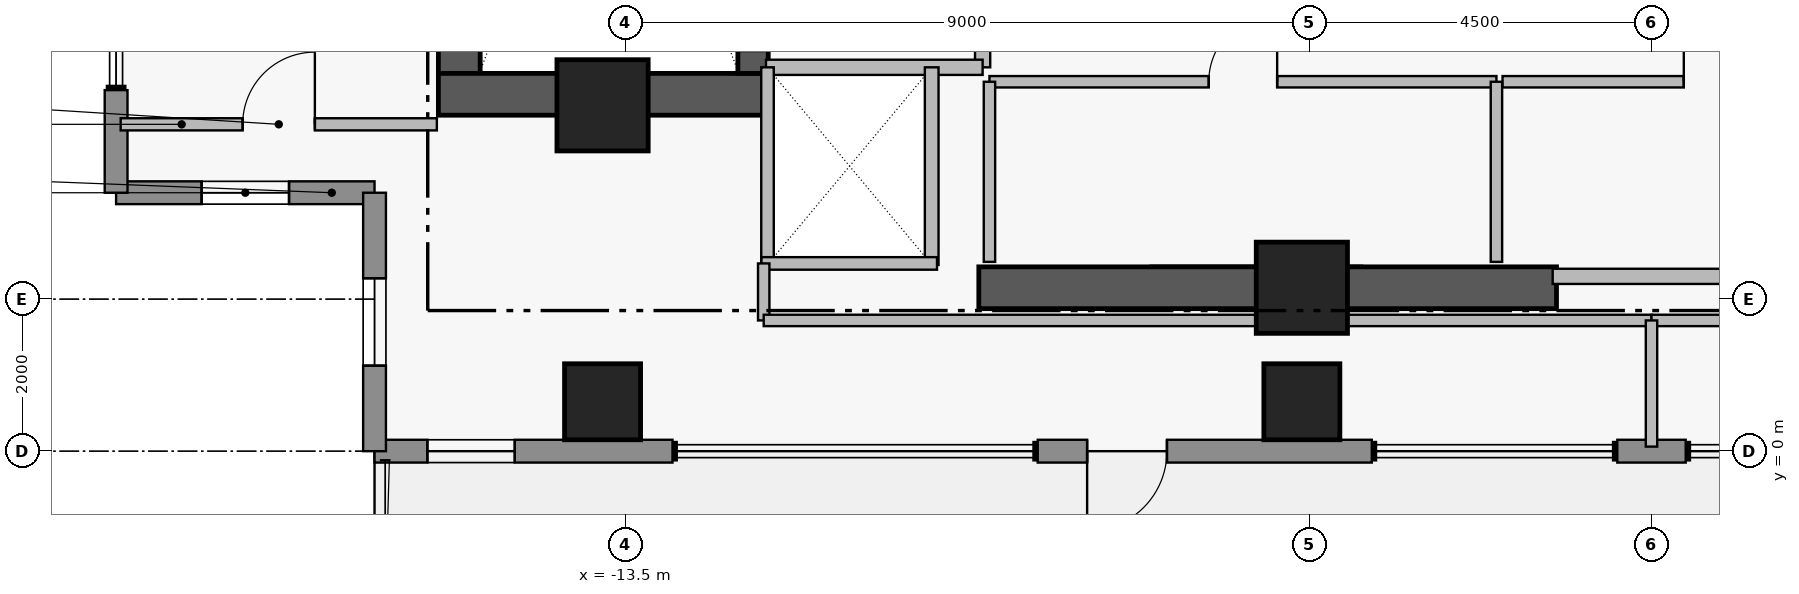
"""IFC4 building model, lengths in metres.
Left out: names, types, materials, properties, quantities, classifications, styles, units other than length and angle.
Written with IfcOpenShell. Run it as: python <this file> out.ifc"""

import sys

from ifc_helpers import new_model, si_unit, direction, frame, frame_2d, origin, origin_2d, place, context, subcontext, project, spatial, rectangle, extrude, element, fill, save


model = new_model("IFC4")
c1 = context("Model", 3, precision=1e-05, world=origin(), true_north=direction((0.0, 1.0)))
c2 = subcontext(c1, "Body", "Model", "MODEL_VIEW")
j1 = project(units=[si_unit("LENGTHUNIT", "METRE"), si_unit("PLANEANGLEUNIT", "RADIAN")], contexts=[c1])
p1 = place(None, origin())
s1 = spatial("IfcSite", under=j1, at=p1, CompositionType="ELEMENT")
p2 = place(p1, origin())
s2 = spatial("IfcBuilding", under=s1, at=p2, CompositionType="ELEMENT")
p3 = place(p2, frame((0.0, 0.0, 261.85)))
s3 = spatial("IfcBuildingStorey", under=s2, at=p3, CompositionType="ELEMENT", Elevation=261.85)
p4 = place(p3, frame((-15.685, 4.97, 0.0), z_axis=(0.0, 0.0, 1.0), x_axis=(0.0, 1.0, 0.0)))
e1 = element("IfcWall", 1, at=p4, inside=s3, PredefinedType="SHEAR", context=c2, shape_type="SweptSolid", body=[
    extrude(rectangle(XDim=8.96, YDim=0.55, at=frame_2d((4.48, 0.0))), origin(), (0.0, 0.0, 1.0), 3.51),
])
p5 = place(p3, frame((-15.96, 4.695, 0.0), z_axis=(0.0, 0.0, 1.0), x_axis=(1.0, 0.0, 0.0)))
e2 = element("IfcWall", 2, at=p5, inside=s3, PredefinedType="SHEAR", context=c2, shape_type="SweptSolid", body=[
    extrude(rectangle(XDim=4.36, YDim=0.55, at=frame_2d((2.18, 0.0))), origin(), (0.0, 0.0, 1.0), 3.51),
])
p6 = place(p3, frame((-8.85, 2.15, 0.0), z_axis=(0.0, 0.0, 1.0), x_axis=(1.0, 0.0, 0.0)))
e3 = element("IfcWall", 3, at=p6, inside=s3, PredefinedType="SHEAR", context=c2, shape_type="SweptSolid", body=[
    extrude(rectangle(XDim=7.6, YDim=0.55, at=frame_2d((3.8, 0.0))), origin(), (0.0, 0.0, 1.0), 3.48),
])
p7 = place(p3, frame((-11.82, 4.97, 0.0), z_axis=(0.0, 0.0, 1.0), x_axis=(0.0, 1.0, 0.0)))
e4 = element("IfcWall", 4, at=p7, inside=s3, PredefinedType="SHEAR", context=c2, shape_type="SweptSolid", body=[
    extrude(rectangle(XDim=8.96, YDim=0.4, at=frame_2d((4.48, 0.0))), origin(), (0.0, 0.0, 1.0), 3.51),
])
p8 = place(p7, frame((0.31, 0.0, 0.0)))
e5 = element("IfcOpeningElement", 5, at=p8, cuts=e4, PredefinedType="OPENING", context=c2, shape_type="SweptSolid", body=[
    extrude(rectangle(XDim=1.12, YDim=2.22, at=frame_2d((0.56, 1.11))), frame((0.0, 0.21, 0.0), z_axis=(0.0, -1.0, 0.0), x_axis=(1.0, 0.0, 0.0)), (0.0, 0.0, 1.0), 0.42),
])
for number, where, z_axis, x_axis in (
    (6, (-13.8, 4.55, 0.0), (0.0, 0.0, 1.0), (1.0, 0.0, 0.0)),
    (7, (-4.6, 2.15, 0.0), (0.0, 0.0, 1.0), (1.0, 0.0, 0.0)),
):
    element("IfcColumn", number, at=place(p3, frame(where, z_axis=z_axis, x_axis=x_axis)), inside=s3, PredefinedType="COLUMN", context=c2, shape_type="SweptSolid", body=[
        extrude(rectangle(XDim=1.2, YDim=1.2, at=origin_2d()), origin(), (0.0, 0.0, 1.0), 3.7),
    ])
for number, where, z_axis, x_axis in (
    (8, (-13.8, 0.65, 0.0), (0.0, 0.0, 1.0), (1.0, 0.0, 0.0)),
    (9, (-4.6, 0.65, 0.0), (0.0, 0.0, 1.0), (1.0, 0.0, 0.0)),
):
    element("IfcColumn", number, at=place(p3, frame(where, z_axis=z_axis, x_axis=x_axis)), inside=s3, PredefinedType="COLUMN", context=c2, shape_type="SweptSolid", body=[
        extrude(rectangle(XDim=1.0, YDim=1.0, at=origin_2d()), origin(), (0.0, 0.0, 1.0), 3.7),
    ])
p9 = place(p3, frame((-16.8, 3.4, 0.0), z_axis=(0.0, 0.0, 1.0), x_axis=(-1.0, 0.0, 0.0)))
e10 = element("IfcWall", 10, at=p9, inside=s3, PredefinedType="STANDARD", context=c2, shape_type="SweptSolid", body=[
    extrude(rectangle(XDim=3.4, YDim=0.3, at=frame_2d((1.7, 0.0))), origin(), (0.0, 0.0, 1.0), 3.48),
])
p10 = place(p9, frame((1.125, 0.0, 1.25)))
e11 = element("IfcOpeningElement", 11, at=p10, cuts=e10, PredefinedType="OPENING", context=c2, shape_type="SweptSolid", body=[
    extrude(rectangle(XDim=1.15, YDim=1.55, at=frame_2d((0.575, 0.775))), frame((0.0, 0.16, 0.0), z_axis=(0.0, -1.0, 0.0), x_axis=(1.0, 0.0, 0.0)), (0.0, 0.0, 1.0), 0.32),
])
p11 = place(p3, frame((-20.2, 3.4, 0.0), z_axis=(0.0, 0.0, 1.0), x_axis=(0.0, 1.0, 0.0)))
e12 = element("IfcWall", 12, at=p11, inside=s3, PredefinedType="STANDARD", context=c2, shape_type="SweptSolid", body=[
    extrude(rectangle(XDim=1.35, YDim=0.3, at=frame_2d((0.675, 0.0))), origin(), (0.0, 0.0, 1.0), 3.48),
])
p12 = place(p3, frame((0.45, 0.0, 0.0), z_axis=(0.0, 0.0, 1.0), x_axis=(-1.0, 0.0, 0.0)))
e13 = element("IfcWall", 13, at=p12, inside=s3, PredefinedType="STANDARD", context=c2, shape_type="SweptSolid", body=[
    extrude(rectangle(XDim=0.9, YDim=0.3, at=frame_2d((0.45, 0.0))), origin(), (0.0, 0.0, 1.0), 3.48),
])
p13 = place(p3, frame((-3.68, 0.0, 0.0), z_axis=(0.0, 0.0, 1.0), x_axis=(-1.0, 0.0, 0.0)))
e14 = element("IfcWall", 14, at=p13, inside=s3, PredefinedType="STANDARD", context=c2, shape_type="SweptSolid", body=[
    extrude(rectangle(XDim=4.395, YDim=0.3, at=frame_2d((2.198, 0.0))), origin(), (0.0, 0.0, 1.0), 3.48),
])
p14 = place(p13, frame((2.695, 0.0, 0.0)))
e15 = element("IfcOpeningElement", 15, at=p14, cuts=e14, PredefinedType="OPENING", context=c2, shape_type="SweptSolid", body=[
    extrude(rectangle(XDim=1.05, YDim=2.2, at=frame_2d((0.525, 1.1))), frame((0.0, 0.16, 0.0), z_axis=(0.0, -1.0, 0.0), x_axis=(1.0, 0.0, 0.0)), (0.0, 0.0, 1.0), 0.32),
])
p15 = place(p3, frame((-12.88, 0.0, 0.0), z_axis=(0.0, 0.0, 1.0), x_axis=(-1.0, 0.0, 0.0)))
e16 = element("IfcWall", 16, at=p15, inside=s3, PredefinedType="STANDARD", context=c2, shape_type="SweptSolid", body=[
    extrude(rectangle(XDim=3.92, YDim=0.3, at=frame_2d((1.96, 0.0))), origin(), (0.0, 0.0, 1.0), 3.48),
])
p16 = place(p15, frame((2.075, 0.0, 0.95)))
e17 = element("IfcOpeningElement", 17, at=p16, cuts=e16, PredefinedType="OPENING", context=c2, shape_type="SweptSolid", body=[
    extrude(rectangle(XDim=1.15, YDim=1.55, at=frame_2d((0.575, 0.775))), frame((0.0, 0.16, 0.0), z_axis=(0.0, -1.0, 0.0), x_axis=(1.0, 0.0, 0.0)), (0.0, 0.0, 1.0), 0.32),
])
p17 = place(p3, frame((-16.8, 0.0, 0.0), z_axis=(0.0, 0.0, 1.0), x_axis=(0.0, 1.0, 0.0)))
e18 = element("IfcWall", 18, at=p17, inside=s3, PredefinedType="STANDARD", context=c2, shape_type="SweptSolid", body=[
    extrude(rectangle(XDim=3.4, YDim=0.3, at=frame_2d((1.7, 0.0))), origin(), (0.0, 0.0, 1.0), 3.48),
])
p18 = place(p17, frame((1.125, 0.0, 1.25)))
e19 = element("IfcOpeningElement", 19, at=p18, cuts=e18, PredefinedType="OPENING", context=c2, shape_type="SweptSolid", body=[
    extrude(rectangle(XDim=1.15, YDim=1.55, at=frame_2d((0.575, 0.775))), frame((0.0, 0.16, 0.0), z_axis=(0.0, -1.0, 0.0), x_axis=(1.0, 0.0, 0.0)), (0.0, 0.0, 1.0), 0.32),
])
p19 = place(p3, frame((-8.8, 5.05, 0.0), z_axis=(0.0, 0.0, 1.0), x_axis=(0.0, 1.0, 0.0)))
e20 = element("IfcWall", 20, at=p19, inside=s3, PredefinedType="PARTITIONING", context=c2, shape_type="SweptSolid", body=[
    extrude(rectangle(XDim=6.1, YDim=0.2, at=frame_2d((3.05, 0.0))), origin(), (0.0, 0.0, 1.0), 3.48),
])
p20 = place(p19, frame((0.25, 0.0, 0.0)))
e21 = element("IfcOpeningElement", 21, at=p20, cuts=e20, PredefinedType="OPENING", context=c2, shape_type="SweptSolid", body=[
    extrude(rectangle(XDim=1.1, YDim=2.2, at=frame_2d((0.55, 1.1))), frame((0.0, 0.11, 0.0), z_axis=(0.0, -1.0, 0.0), x_axis=(1.0, 0.0, 0.0)), (0.0, 0.0, 1.0), 0.22),
])
p21 = place(p19, frame((3.85, 0.0, 0.0)))
e22 = element("IfcOpeningElement", 22, at=p21, cuts=e20, PredefinedType="OPENING", context=c2, shape_type="SweptSolid", body=[
    extrude(rectangle(XDim=1.1, YDim=2.2, at=frame_2d((0.55, 1.1))), frame((0.0, 0.11, 0.0), z_axis=(0.0, -1.0, 0.0), x_axis=(1.0, 0.0, 0.0)), (0.0, 0.0, 1.0), 0.22),
])
p22 = place(p3, frame((-8.71, 4.86, 0.0), z_axis=(0.0, 0.0, 1.0), x_axis=(1.0, 0.0, 0.0)))
e23 = element("IfcWall", 23, at=p22, inside=s3, PredefinedType="PARTITIONING", context=c2, shape_type="SweptSolid", body=[
    extrude(rectangle(XDim=6.67, YDim=0.15, at=frame_2d((3.335, 0.0))), origin(), (0.0, 0.0, 1.0), 3.48),
])
p23 = place(p22, frame((2.885, 0.0, 0.0)))
e24 = element("IfcOpeningElement", 24, at=p23, cuts=e23, PredefinedType="OPENING", context=c2, shape_type="SweptSolid", body=[
    extrude(rectangle(XDim=0.9, YDim=2.15, at=frame_2d((0.45, 1.075))), frame((0.0, 0.085, 0.0), z_axis=(0.0, -1.0, 0.0), x_axis=(1.0, 0.0, 0.0)), (0.0, 0.0, 1.0), 0.17),
])
p24 = place(p3, frame((-1.96, 4.86, 0.0), z_axis=(0.0, 0.0, 1.0), x_axis=(1.0, 0.0, 0.0)))
e25 = element("IfcWall", 25, at=p24, inside=s3, PredefinedType="PARTITIONING", context=c2, shape_type="SweptSolid", body=[
    extrude(rectangle(XDim=5.67, YDim=0.15, at=frame_2d((2.835, 0.0))), origin(), (0.0, 0.0, 1.0), 3.48),
])
p25 = place(p24, frame((2.385, 0.0, 0.0)))
e26 = element("IfcOpeningElement", 26, at=p25, cuts=e25, PredefinedType="OPENING", context=c2, shape_type="SweptSolid", body=[
    extrude(rectangle(XDim=0.9, YDim=2.15, at=frame_2d((0.45, 1.075))), frame((0.0, 0.085, 0.0), z_axis=(0.0, -1.0, 0.0), x_axis=(1.0, 0.0, 0.0)), (0.0, 0.0, 1.0), 0.17),
])
p26 = place(p3, frame((-20.14, 4.3, 0.0), z_axis=(0.0, 0.0, 1.0), x_axis=(1.0, 0.0, 0.0)))
e27 = element("IfcWall", 27, at=p26, inside=s3, PredefinedType="PARTITIONING", context=c2, shape_type="SweptSolid", body=[
    extrude(rectangle(XDim=4.16, YDim=0.16, at=frame_2d((2.08, 0.0))), origin(), (0.0, 0.0, 1.0), 3.48),
])
p27 = place(p26, frame((1.605, 0.0, 0.0)))
e28 = element("IfcOpeningElement", 28, at=p27, cuts=e27, PredefinedType="OPENING", context=c2, shape_type="SweptSolid", body=[
    extrude(rectangle(XDim=0.95, YDim=2.15, at=frame_2d((0.475, 1.075))), frame((0.0, 0.09, 0.0), z_axis=(0.0, -1.0, 0.0), x_axis=(1.0, 0.0, 0.0)), (0.0, 0.0, 1.0), 0.18),
])
p28 = place(p3, frame((-11.65, 5.05, 0.0), z_axis=(0.0, 0.0, 1.0), x_axis=(1.0, 0.0, 0.0)))
e29 = element("IfcWall", 29, at=p28, inside=s3, PredefinedType="PARTITIONING", context=c2, shape_type="SweptSolid", body=[
    extrude(rectangle(XDim=2.85, YDim=0.2, at=frame_2d((1.425, 0.0))), origin(), (0.0, 0.0, 1.0), 3.48),
])
p29 = place(p3, frame((-1.3, 2.3, 0.0), z_axis=(0.0, 0.0, 1.0), x_axis=(1.0, 0.0, 0.0)))
e30 = element("IfcWall", 30, at=p29, inside=s3, PredefinedType="PARTITIONING", context=c2, shape_type="SweptSolid", body=[
    extrude(rectangle(XDim=2.6, YDim=0.2, at=frame_2d((1.3, 0.0))), origin(), (0.0, 0.0, 1.0), 2.38),
])
for number, where, z_axis, x_axis in (
    (31, (-8.71, 2.49, 0.0), (0.0, 0.0, 1.0), (0.0, 1.0, 0.0)),
    (32, (-2.04, 2.49, 0.0), (0.0, 0.0, 1.0), (0.0, 1.0, 0.0)),
):
    element("IfcWall", number, at=place(p3, frame(where, z_axis=z_axis, x_axis=x_axis)), inside=s3, PredefinedType="PARTITIONING", context=c2, shape_type="SweptSolid", body=[
        extrude(rectangle(XDim=2.37, YDim=0.15, at=frame_2d((1.185, 0.0))), origin(), (0.0, 0.0, 1.0), 3.48),
    ])
p30 = place(p3, frame((-9.47, 2.45, 0.0), z_axis=(0.0, 0.0, 1.0), x_axis=(0.0, 1.0, 0.0)))
e33 = element("IfcWall", 33, at=p30, inside=s3, PredefinedType="PARTITIONING", context=c2, shape_type="SweptSolid", body=[
    extrude(rectangle(XDim=2.6, YDim=0.18, at=frame_2d((1.3, 0.0))), origin(), (0.0, 0.0, 1.0), 3.48),
])
p31 = place(p3, frame((-11.63, 2.47, 0.0), z_axis=(0.0, 0.0, 1.0), x_axis=(0.0, 1.0, 0.0)))
e34 = element("IfcWall", 34, at=p31, inside=s3, PredefinedType="PARTITIONING", context=c2, shape_type="SweptSolid", body=[
    extrude(rectangle(XDim=2.58, YDim=0.165, at=frame_2d((1.29, 0.0))), origin(), (0.0, 0.0, 1.0), 3.48),
])
p32 = place(p3, frame((-11.71, 2.47, 0.0), z_axis=(0.0, 0.0, 1.0), x_axis=(1.0, 0.0, 0.0)))
e35 = element("IfcWall", 35, at=p32, inside=s3, PredefinedType="PARTITIONING", context=c2, shape_type="SweptSolid", body=[
    extrude(rectangle(XDim=2.31, YDim=0.165, at=frame_2d((1.155, 0.0))), origin(), (0.0, 0.0, 1.0), 2.38),
])
p33 = place(p3, frame((-11.68, 1.72, 0.0), z_axis=(0.0, 0.0, 1.0), x_axis=(0.0, 1.0, 0.0)))
e36 = element("IfcWall", 36, at=p33, inside=s3, PredefinedType="PARTITIONING", context=c2, shape_type="SweptSolid", body=[
    extrude(rectangle(XDim=0.75, YDim=0.15, at=frame_2d((0.375, 0.0))), origin(), (0.0, 0.0, 1.0), 3.48),
])
for number, where, z_axis, x_axis in (
    (37, (-11.68, 1.72, 0.0), (0.0, 0.0, 1.0), (1.0, 0.0, 0.0)),
    (38, (0.0, 1.72, 0.0), (0.0, 0.0, 1.0), (1.0, 0.0, 0.0)),
):
    element("IfcWall", number, at=place(p3, frame(where, z_axis=z_axis, x_axis=x_axis)), inside=s3, PredefinedType="PARTITIONING", context=c2, shape_type="SweptSolid", body=[
        extrude(rectangle(XDim=11.68, YDim=0.15, at=frame_2d((5.84, 0.0))), origin(), (0.0, 0.0, 1.0), 2.38),
    ])
p34 = place(p3, frame((0.0, 0.06, 0.0), z_axis=(0.0, 0.0, 1.0), x_axis=(0.0, 1.0, 0.0)))
e39 = element("IfcWall", 39, at=p34, inside=s3, PredefinedType="PARTITIONING", context=c2, shape_type="SweptSolid", body=[
    extrude(rectangle(XDim=1.66, YDim=0.15, at=frame_2d((0.83, 0.0))), origin(), (0.0, 0.0, 1.0), 3.48),
])
p35 = place(p10, origin())
e40 = element("IfcWindow", 40, at=p35, inside=s3, PartitioningType="SINGLE_PANEL", PredefinedType="WINDOW", context=c2, shape_type="SweptSolid", body=[
    extrude(rectangle(XDim=1.15, YDim=1.55, at=frame_2d((0.575, 0.775))), frame((0.0, 0.03, 0.0), z_axis=(0.0, -1.0, 0.0), x_axis=(1.0, 0.0, 0.0)), (0.0, 0.0, 1.0), 0.06),
])
fill(e11, e40)
p36 = place(p14, origin())
e41 = element("IfcDoor", 41, at=p36, inside=s3, OperationType="SINGLE_SWING_RIGHT", PredefinedType="DOOR", context=c2, shape_type="SweptSolid", body=[
    extrude(rectangle(XDim=1.05, YDim=2.2, at=frame_2d((0.525, 1.1))), frame((0.0, 0.025, 0.0), z_axis=(0.0, -1.0, 0.0), x_axis=(1.0, 0.0, 0.0)), (0.0, 0.0, 1.0), 0.05),
])
fill(e15, e41)
p37 = place(p16, origin())
e42 = element("IfcWindow", 42, at=p37, inside=s3, PartitioningType="SINGLE_PANEL", PredefinedType="WINDOW", context=c2, shape_type="SweptSolid", body=[
    extrude(rectangle(XDim=1.15, YDim=1.55, at=frame_2d((0.575, 0.775))), frame((0.0, 0.03, 0.0), z_axis=(0.0, -1.0, 0.0), x_axis=(1.0, 0.0, 0.0)), (0.0, 0.0, 1.0), 0.06),
])
fill(e17, e42)
p38 = place(p18, origin())
e43 = element("IfcWindow", 43, at=p38, inside=s3, PartitioningType="SINGLE_PANEL", PredefinedType="WINDOW", context=c2, shape_type="SweptSolid", body=[
    extrude(rectangle(XDim=1.15, YDim=1.55, at=frame_2d((0.575, 0.775))), frame((0.0, 0.03, 0.0), z_axis=(0.0, -1.0, 0.0), x_axis=(1.0, 0.0, 0.0)), (0.0, 0.0, 1.0), 0.06),
])
fill(e19, e43)
p39 = place(p23, origin())
e44 = element("IfcDoor", 44, at=p39, inside=s3, OperationType="SINGLE_SWING_RIGHT", PredefinedType="DOOR", context=c2, shape_type="SweptSolid", body=[
    extrude(rectangle(XDim=0.9, YDim=2.15, at=frame_2d((0.45, 1.075))), frame((0.0, 0.025, 0.0), z_axis=(0.0, -1.0, 0.0), x_axis=(1.0, 0.0, 0.0)), (0.0, 0.0, 1.0), 0.05),
])
fill(e24, e44)
p40 = place(p25, origin())
e45 = element("IfcDoor", 45, at=p40, inside=s3, OperationType="SINGLE_SWING_LEFT", PredefinedType="DOOR", context=c2, shape_type="SweptSolid", body=[
    extrude(rectangle(XDim=0.9, YDim=2.15, at=frame_2d((0.45, 1.075))), frame((0.0, 0.025, 0.0), z_axis=(0.0, -1.0, 0.0), x_axis=(1.0, 0.0, 0.0)), (0.0, 0.0, 1.0), 0.05),
])
fill(e26, e45)
p41 = place(p27, origin())
e46 = element("IfcDoor", 46, at=p41, inside=s3, OperationType="SINGLE_SWING_RIGHT", PredefinedType="DOOR", context=c2, shape_type="SweptSolid", body=[
    extrude(rectangle(XDim=0.95, YDim=2.15, at=frame_2d((0.475, 1.075))), frame((0.0, 0.025, 0.0), z_axis=(0.0, -1.0, 0.0), x_axis=(1.0, 0.0, 0.0)), (0.0, 0.0, 1.0), 0.05),
])
fill(e28, e46)
save(model, sys.argv[1])
